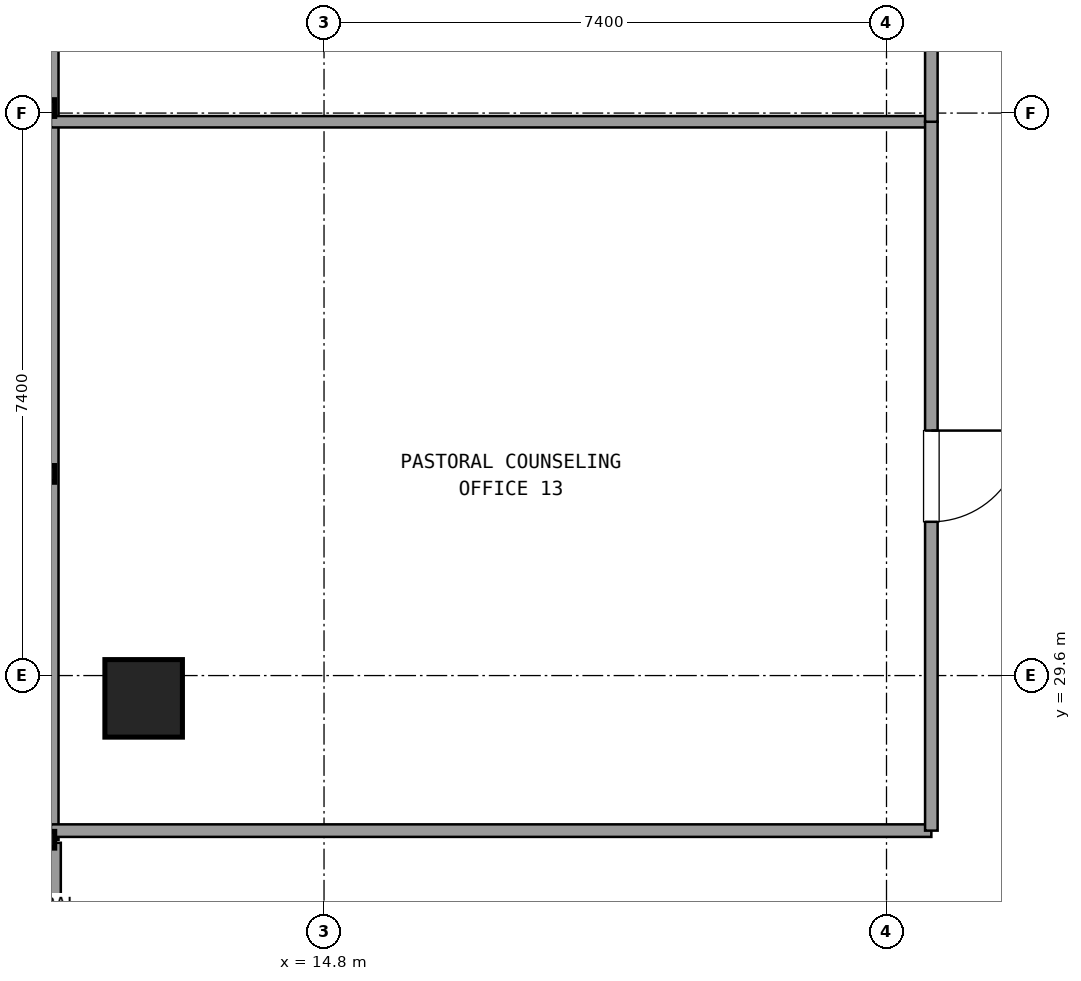
"""IFC4 building model, lengths in metres.
Left out: names, types, materials, properties, quantities, classifications, styles, units other than length and angle.
Written with IfcOpenShell. Run it as: python <this file> out.ifc"""

import sys

from ifc_helpers import new_model, si_unit, direction, frame, frame_2d, origin, origin_2d, place, context, subcontext, project, spatial, rectangle, extrude, element, fill, save


model = new_model("IFC4")
c1 = context("Model", 3, precision=1e-05, world=origin(), true_north=direction((0.0, 1.0)))
c2 = subcontext(c1, "Body", "Model", "MODEL_VIEW")
j1 = project(units=[si_unit("LENGTHUNIT", "METRE"), si_unit("PLANEANGLEUNIT", "RADIAN")], contexts=[c1])
p1 = place(None, origin())
s1 = spatial("IfcSite", under=j1, at=p1, CompositionType="ELEMENT")
p2 = place(p1, origin())
s2 = spatial("IfcBuilding", under=s1, at=p2, CompositionType="ELEMENT")
p3 = place(p2, frame((0.0, 0.0, 99.18)))
s3 = spatial("IfcBuildingStorey", under=s2, at=p3, CompositionType="ELEMENT", Elevation=99.18)
p4 = place(p3, frame((12.427, 29.3, 0.021), z_axis=(0.084573087246, 0.0, 0.99641727851), x_axis=(0.0, 1.0, 0.0)))
e1 = element("IfcColumn", 1, at=p4, inside=s3, PredefinedType="COLUMN", context=c2, shape_type="SweptSolid", body=[
    extrude(rectangle(XDim=1.02, YDim=1.02, at=origin_2d()), origin(), (0.0, 0.0, 1.0), 3.571),
])
p5 = place(p3, frame((11.187, 27.4, 0.0), z_axis=(0.0, 0.0, 1.0), x_axis=(0.0, -1.0, 0.0)))
e2 = element("IfcWall", 2, at=p5, inside=s3, PredefinedType="SOLIDWALL", context=c2, shape_type="SweptSolid", body=[
    extrude(rectangle(XDim=3.0, YDim=0.3, at=frame_2d((1.5, 0.0))), origin(), (0.0, 0.0, 1.0), 2.67),
])
p6 = place(p5, frame((0.9, 0.0, 0.0)))
e3 = element("IfcOpeningElement", 3, at=p6, cuts=e2, PredefinedType="OPENING", context=c2, shape_type="SweptSolid", body=[
    extrude(rectangle(XDim=1.2, YDim=2.2, at=frame_2d((0.6, 1.1))), frame((0.0, 0.16, 0.0), z_axis=(0.0, -1.0, 0.0), x_axis=(1.0, 0.0, 0.0)), (0.0, 0.0, 1.0), 0.32),
])
p7 = place(p3, frame((11.187, 41.879, 0.0), z_axis=(0.0, 0.0, 1.0), x_axis=(0.0, -1.0, 0.0)))
e4 = element("IfcWall", 4, at=p7, inside=s3, PredefinedType="SOLIDWALL", context=c2, shape_type="SweptSolid", body=[
    extrude(rectangle(XDim=14.439, YDim=0.24, at=frame_2d((7.219, 0.0))), origin(), (0.0, 0.0, 1.0), 0.85),
])
p8 = place(p3, frame((11.207, 27.56, 0.0), z_axis=(0.0, 0.0, 1.0), x_axis=(1.0, 0.0, 0.0)))
e5 = element("IfcWall", 5, at=p8, inside=s3, PredefinedType="PARTITIONING", context=c2, shape_type="SweptSolid", body=[
    extrude(rectangle(XDim=11.583, YDim=0.165, at=frame_2d((5.792, 0.0))), origin(), (0.0, 0.0, 1.0), 2.61),
])
p9 = place(p3, frame((22.79, 36.886, 0.0), z_axis=(0.0, 0.0, 1.0), x_axis=(-1.0, 0.0, 0.0)))
e6 = element("IfcWall", 6, at=p9, inside=s3, PredefinedType="PARTITIONING", context=c2, shape_type="SweptSolid", body=[
    extrude(rectangle(XDim=11.583, YDim=0.15, at=frame_2d((5.792, 0.0))), origin(), (0.0, 0.0, 1.0), 2.61),
])
p10 = place(p3, frame((22.79, 27.56, 0.0), z_axis=(0.0, 0.0, 1.0), x_axis=(0.0, 1.0, 0.0)))
e7 = element("IfcWall", 7, at=p10, inside=s3, PredefinedType="PARTITIONING", context=c2, shape_type="SweptSolid", body=[
    extrude(rectangle(XDim=9.326, YDim=0.165, at=frame_2d((4.663, 0.0))), origin(), (0.0, 0.0, 1.0), 2.61),
])
p11 = place(p10, frame((4.063, 0.0, 0.0)))
e8 = element("IfcOpeningElement", 8, at=p11, cuts=e7, PredefinedType="OPENING", context=c2, shape_type="SweptSolid", body=[
    extrude(rectangle(XDim=1.2, YDim=2.15, at=frame_2d((0.6, 1.075))), frame((0.0, 0.093, 0.0), z_axis=(0.0, -1.0, 0.0), x_axis=(1.0, 0.0, 0.0)), (0.0, 0.0, 1.0), 0.185),
])
p12 = place(p3, frame((22.79, 36.886, 0.0), z_axis=(0.0, 0.0, 1.0), x_axis=(0.0, 1.0, 0.0)))
e9 = element("IfcWall", 9, at=p12, inside=s3, PredefinedType="PARTITIONING", context=c2, shape_type="SweptSolid", body=[
    extrude(rectangle(XDim=10.948, YDim=0.165, at=frame_2d((5.474, 0.0))), origin(), (0.0, 0.0, 1.0), 2.61),
])
p13 = place(p12, frame((4.874, 0.0, 0.0)))
e10 = element("IfcOpeningElement", 10, at=p13, cuts=e9, PredefinedType="OPENING", context=c2, shape_type="SweptSolid", body=[
    extrude(rectangle(XDim=1.2, YDim=2.15, at=frame_2d((0.6, 1.075))), frame((0.0, 0.093, 0.0), z_axis=(0.0, -1.0, 0.0), x_axis=(1.0, 0.0, 0.0)), (0.0, 0.0, 1.0), 0.185),
])
p14 = place(p11, frame((1.2, 0.0, 0.0), z_axis=(0.0, 0.0, 1.0), x_axis=(-1.0, 0.0, 0.0)))
e11 = element("IfcDoor", 11, at=p14, inside=s3, OperationType="SINGLE_SWING_RIGHT", PredefinedType="DOOR", context=c2, shape_type="SweptSolid", body=[
    extrude(rectangle(XDim=1.2, YDim=2.15, at=frame_2d((0.6, 1.075))), frame((0.0, 0.025, 0.0), z_axis=(0.0, -1.0, 0.0), x_axis=(1.0, 0.0, 0.0)), (0.0, 0.0, 1.0), 0.05),
])
fill(e8, e11)
save(model, sys.argv[1])
